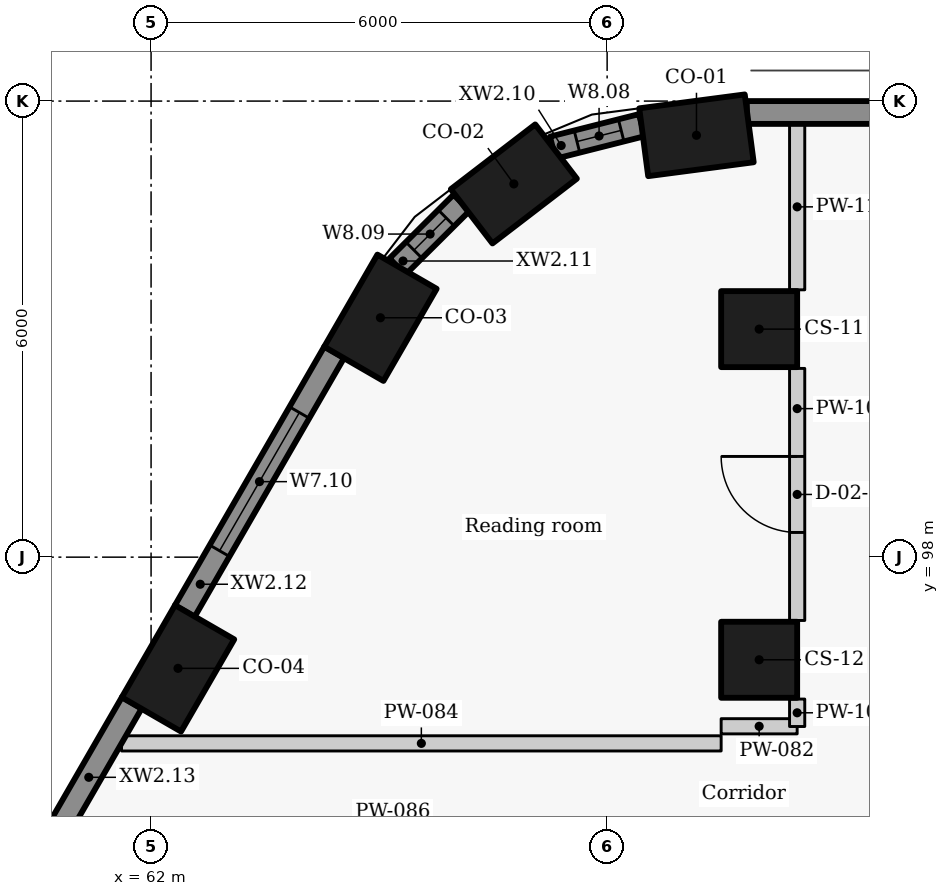
"""IFC4 building model, lengths in metres.
Left out: names, types, materials, properties, quantities, classifications, styles, units other than length and angle.
Written with IfcOpenShell. Run it as: python <this file> out.ifc"""

import sys

from ifc_helpers import new_model, si_unit, direction, frame, frame_2d, origin, origin_2d, place, context, subcontext, project, spatial, rectangle, extrude, element, fill, save


model = new_model("IFC4")
c1 = context("Model", 3, precision=1e-05, world=origin(), true_north=direction((0.0, 1.0)))
c2 = subcontext(c1, "Body", "Model", "MODEL_VIEW")
j1 = project(units=[si_unit("LENGTHUNIT", "METRE"), si_unit("PLANEANGLEUNIT", "RADIAN")], contexts=[c1])
p1 = place(None, origin())
s1 = spatial("IfcSite", under=j1, at=p1, CompositionType="ELEMENT")
p2 = place(p1, origin())
s2 = spatial("IfcBuilding", under=s1, at=p2, CompositionType="ELEMENT")
p3 = place(p2, frame((0.0, 0.0, 114.0)))
s3 = spatial("IfcBuildingStorey", under=s2, at=p3, CompositionType="ELEMENT", Elevation=114.0)
for number, where, z_axis, x_axis in (
    (1, (69.175, 103.55, 0.0), (0.0, 0.0, 1.0), (-0.991, -0.131, 0.0)),
    (2, (66.773, 102.91, 0.0), (0.0, 0.0, 1.0), (-0.793, -0.609, 0.0)),
    (3, (65.018, 101.149, 0.0), (0.0, 0.0, 1.0), (-0.5, -0.866, 0.0)),
    (4, (62.354, 96.537, 0.0), (0.0, 0.0, 1.0), (-0.5, -0.866, 0.0)),
):
    element("IfcColumn", number, at=place(p3, frame(where, z_axis=z_axis, x_axis=x_axis)), inside=s3, PredefinedType="COLUMN", context=c2, shape_type="SweptSolid", body=[
        extrude(rectangle(XDim=1.4, YDim=0.9, at=origin_2d()), origin(), (0.0, 0.0, 1.0), 3.3),
    ])
for number, where, z_axis, x_axis in (
    (5, (70.0, 101.0, 0.0), (0.0, 0.0, 1.0), (0.0, -1.0, 0.0)),
    (6, (70.0, 96.65, 0.0), (0.0, 0.0, 1.0), (0.0, -1.0, 0.0)),
):
    element("IfcColumn", number, at=place(p3, frame(where, z_axis=z_axis, x_axis=x_axis)), inside=s3, PredefinedType="COLUMN", context=c2, shape_type="SweptSolid", body=[
        extrude(rectangle(XDim=1.0, YDim=1.0, at=origin_2d()), origin(), (0.0, 0.0, 1.0), 3.3),
    ])
p4 = place(p3, frame((90.129, 103.85, 0.0), z_axis=(0.0, 0.0, 1.0), x_axis=(-1.0, 0.0, 0.0)))
e7 = element("IfcWall", 7, at=p4, inside=s3, PredefinedType="SOLIDWALL", context=c2, shape_type="SweptSolid", body=[
    extrude(rectangle(XDim=20.291, YDim=0.3, at=frame_2d((10.146, 0.0))), origin(), (0.0, 0.0, 1.0), 2.425),
])
p5 = place(p3, frame((68.456, 103.683, 0.0), z_axis=(0.0, 0.0, 1.0), x_axis=(-0.969485113966, -0.245150186208, 0.0)))
e8 = element("IfcWall", 8, at=p5, inside=s3, PredefinedType="SOLIDWALL", context=c2, shape_type="SweptSolid", body=[
    extrude(rectangle(XDim=1.208, YDim=0.3, at=frame_2d((0.604, 0.0))), origin(), (0.0, 0.0, 1.0), 2.425),
])
p6 = place(p5, frame((0.28, 0.0, 0.9)))
e9 = element("IfcOpeningElement", 9, at=p6, cuts=e8, PredefinedType="OPENING", context=c2, shape_type="SweptSolid", body=[
    extrude(rectangle(XDim=0.6, YDim=1.1, at=frame_2d((0.3, 0.55))), frame((0.0, 0.16, 0.0), z_axis=(0.0, -1.0, 0.0), x_axis=(1.0, 0.0, 0.0)), (0.0, 0.0, 1.0), 0.32),
])
p7 = place(p3, frame((66.085, 102.663, 0.0), z_axis=(0.0, 0.0, 1.0), x_axis=(-0.708951665509, -0.705257070842, 0.0)))
e10 = element("IfcWall", 10, at=p7, inside=s3, PredefinedType="SOLIDWALL", context=c2, shape_type="SweptSolid", body=[
    extrude(rectangle(XDim=1.189, YDim=0.3, at=frame_2d((0.595, 0.0))), origin(), (0.0, 0.0, 1.0), 2.425),
])
p8 = place(p7, frame((0.284, 0.0, 0.9)))
e11 = element("IfcOpeningElement", 11, at=p8, cuts=e10, PredefinedType="OPENING", context=c2, shape_type="SweptSolid", body=[
    extrude(rectangle(XDim=0.6, YDim=1.1, at=frame_2d((0.3, 0.55))), frame((0.0, 0.16, 0.0), z_axis=(0.0, -1.0, 0.0), x_axis=(1.0, 0.0, 0.0)), (0.0, 0.0, 1.0), 0.32),
])
p9 = place(p3, frame((64.41, 100.697, 0.0), z_axis=(0.0, 0.0, 1.0), x_axis=(-0.500003583557, -0.866023334807, 0.0)))
e12 = element("IfcWall", 12, at=p9, inside=s3, PredefinedType="SOLIDWALL", context=c2, shape_type="SweptSolid", body=[
    extrude(rectangle(XDim=3.934, YDim=0.3, at=frame_2d((1.967, 0.0))), origin(), (0.0, 0.0, 1.0), 2.425),
])
p10 = place(p9, frame((0.917, 0.0, 0.9)))
e13 = element("IfcOpeningElement", 13, at=p10, cuts=e12, PredefinedType="OPENING", context=c2, shape_type="SweptSolid", body=[
    extrude(rectangle(XDim=2.1, YDim=1.1, at=frame_2d((1.05, 0.55))), frame((0.0, 0.16, 0.0), z_axis=(0.0, -1.0, 0.0), x_axis=(1.0, 0.0, 0.0)), (0.0, 0.0, 1.0), 0.32),
])
p11 = place(p3, frame((61.747, 96.084, 0.0), z_axis=(0.0, 0.0, 1.0), x_axis=(-0.499957037901, -0.866050206543, 0.0)))
e14 = element("IfcWall", 14, at=p11, inside=s3, PredefinedType="SOLIDWALL", context=c2, shape_type="SweptSolid", body=[
    extrude(rectangle(XDim=3.934, YDim=0.3, at=frame_2d((1.967, 0.0))), origin(), (0.0, 0.0, 1.0), 2.425),
])
p12 = place(p11, frame((2.365, 0.0, 0.9)))
e15 = element("IfcOpeningElement", 15, at=p12, cuts=e14, PredefinedType="OPENING", context=c2, shape_type="SweptSolid", body=[
    extrude(rectangle(XDim=1.2, YDim=1.1, at=frame_2d((0.6, 0.55))), frame((0.0, 0.16, 0.0), z_axis=(0.0, -1.0, 0.0), x_axis=(1.0, 0.0, 0.0)), (0.0, 0.0, 1.0), 0.32),
])
p13 = place(p3, frame((69.5, 95.775, 0.0), z_axis=(0.0, 0.0, 1.0), x_axis=(1.0, 0.0, 0.0)))
e16 = element("IfcWall", 16, at=p13, inside=s3, PredefinedType="PARTITIONING", context=c2, shape_type="SweptSolid", body=[
    extrude(rectangle(XDim=1.0, YDim=0.2, at=frame_2d((0.5, 0.0))), origin(), (0.0, 0.0, 1.0), 2.505),
])
p14 = place(p3, frame((61.611, 95.55, 0.0), z_axis=(0.0, 0.0, 1.0), x_axis=(1.0, 0.0, 0.0)))
e17 = element("IfcWall", 17, at=p14, inside=s3, PredefinedType="PARTITIONING", context=c2, shape_type="SweptSolid", body=[
    extrude(rectangle(XDim=7.889, YDim=0.2, at=frame_2d((3.944, 0.0))), origin(), (0.0, 0.0, 1.0), 2.405),
])
p15 = place(p3, frame((70.5, 95.772, 0.0), z_axis=(0.0, 0.0, 1.0), x_axis=(0.0, 1.0, 0.0)))
e18 = element("IfcWall", 18, at=p15, inside=s3, PredefinedType="PARTITIONING", context=c2, shape_type="SweptSolid", body=[
    extrude(rectangle(XDim=0.361, YDim=0.2, at=frame_2d((0.181, 0.0))), origin(), (0.0, 0.0, 1.0), 3.025),
])
p16 = place(p3, frame((70.5, 97.167, 0.0), z_axis=(0.0, 0.0, 1.0), x_axis=(0.0, 1.0, 0.0)))
e19 = element("IfcWall", 19, at=p16, inside=s3, PredefinedType="PARTITIONING", context=c2, shape_type="SweptSolid", body=[
    extrude(rectangle(XDim=3.316, YDim=0.2, at=frame_2d((1.658, 0.0))), origin(), (0.0, 0.0, 1.0), 3.025),
])
p17 = place(p16, frame((1.158, 0.0, 0.0)))
e20 = element("IfcOpeningElement", 20, at=p17, cuts=e19, PredefinedType="OPENING", context=c2, shape_type="SweptSolid", body=[
    extrude(rectangle(XDim=1.0, YDim=2.1, at=frame_2d((0.5, 1.05))), frame((0.0, 0.11, 0.0), z_axis=(0.0, -1.0, 0.0), x_axis=(1.0, 0.0, 0.0)), (0.0, 0.0, 1.0), 0.22),
])
p18 = place(p3, frame((70.5, 101.517, 0.0), z_axis=(0.0, 0.0, 1.0), x_axis=(0.0, 1.0, 0.0)))
e21 = element("IfcWall", 21, at=p18, inside=s3, PredefinedType="PARTITIONING", context=c2, shape_type="SweptSolid", body=[
    extrude(rectangle(XDim=2.183, YDim=0.2, at=frame_2d((1.091, 0.0))), origin(), (0.0, 0.0, 1.0), 3.025),
])
p19 = place(p6, origin())
e22 = element("IfcWindow", 22, at=p19, inside=s3, PartitioningType="SINGLE_PANEL", PredefinedType="WINDOW", context=c2, shape_type="SweptSolid", body=[
    extrude(rectangle(XDim=0.6, YDim=1.1, at=frame_2d((0.3, 0.55))), frame((0.0, 0.03, 0.0), z_axis=(0.0, -1.0, 0.0), x_axis=(1.0, 0.0, 0.0)), (0.0, 0.0, 1.0), 0.06),
])
fill(e9, e22)
p20 = place(p8, origin())
e23 = element("IfcWindow", 23, at=p20, inside=s3, PartitioningType="SINGLE_PANEL", PredefinedType="WINDOW", context=c2, shape_type="SweptSolid", body=[
    extrude(rectangle(XDim=0.6, YDim=1.1, at=frame_2d((0.3, 0.55))), frame((0.0, 0.03, 0.0), z_axis=(0.0, -1.0, 0.0), x_axis=(1.0, 0.0, 0.0)), (0.0, 0.0, 1.0), 0.06),
])
fill(e11, e23)
p21 = place(p10, origin())
e24 = element("IfcWindow", 24, at=p21, inside=s3, PartitioningType="SINGLE_PANEL", PredefinedType="WINDOW", context=c2, shape_type="SweptSolid", body=[
    extrude(rectangle(XDim=2.1, YDim=1.1, at=frame_2d((1.05, 0.55))), frame((0.0, 0.03, 0.0), z_axis=(0.0, -1.0, 0.0), x_axis=(1.0, 0.0, 0.0)), (0.0, 0.0, 1.0), 0.06),
])
fill(e13, e24)
p22 = place(p17, origin())
e25 = element("IfcDoor", 25, at=p22, inside=s3, OperationType="SINGLE_SWING_RIGHT", PredefinedType="DOOR", context=c2, shape_type="SweptSolid", body=[
    extrude(rectangle(XDim=1.0, YDim=2.1, at=frame_2d((0.5, 1.05))), frame((0.0, 0.025, 0.0), z_axis=(0.0, -1.0, 0.0), x_axis=(1.0, 0.0, 0.0)), (0.0, 0.0, 1.0), 0.05),
])
fill(e20, e25)
save(model, sys.argv[1])
